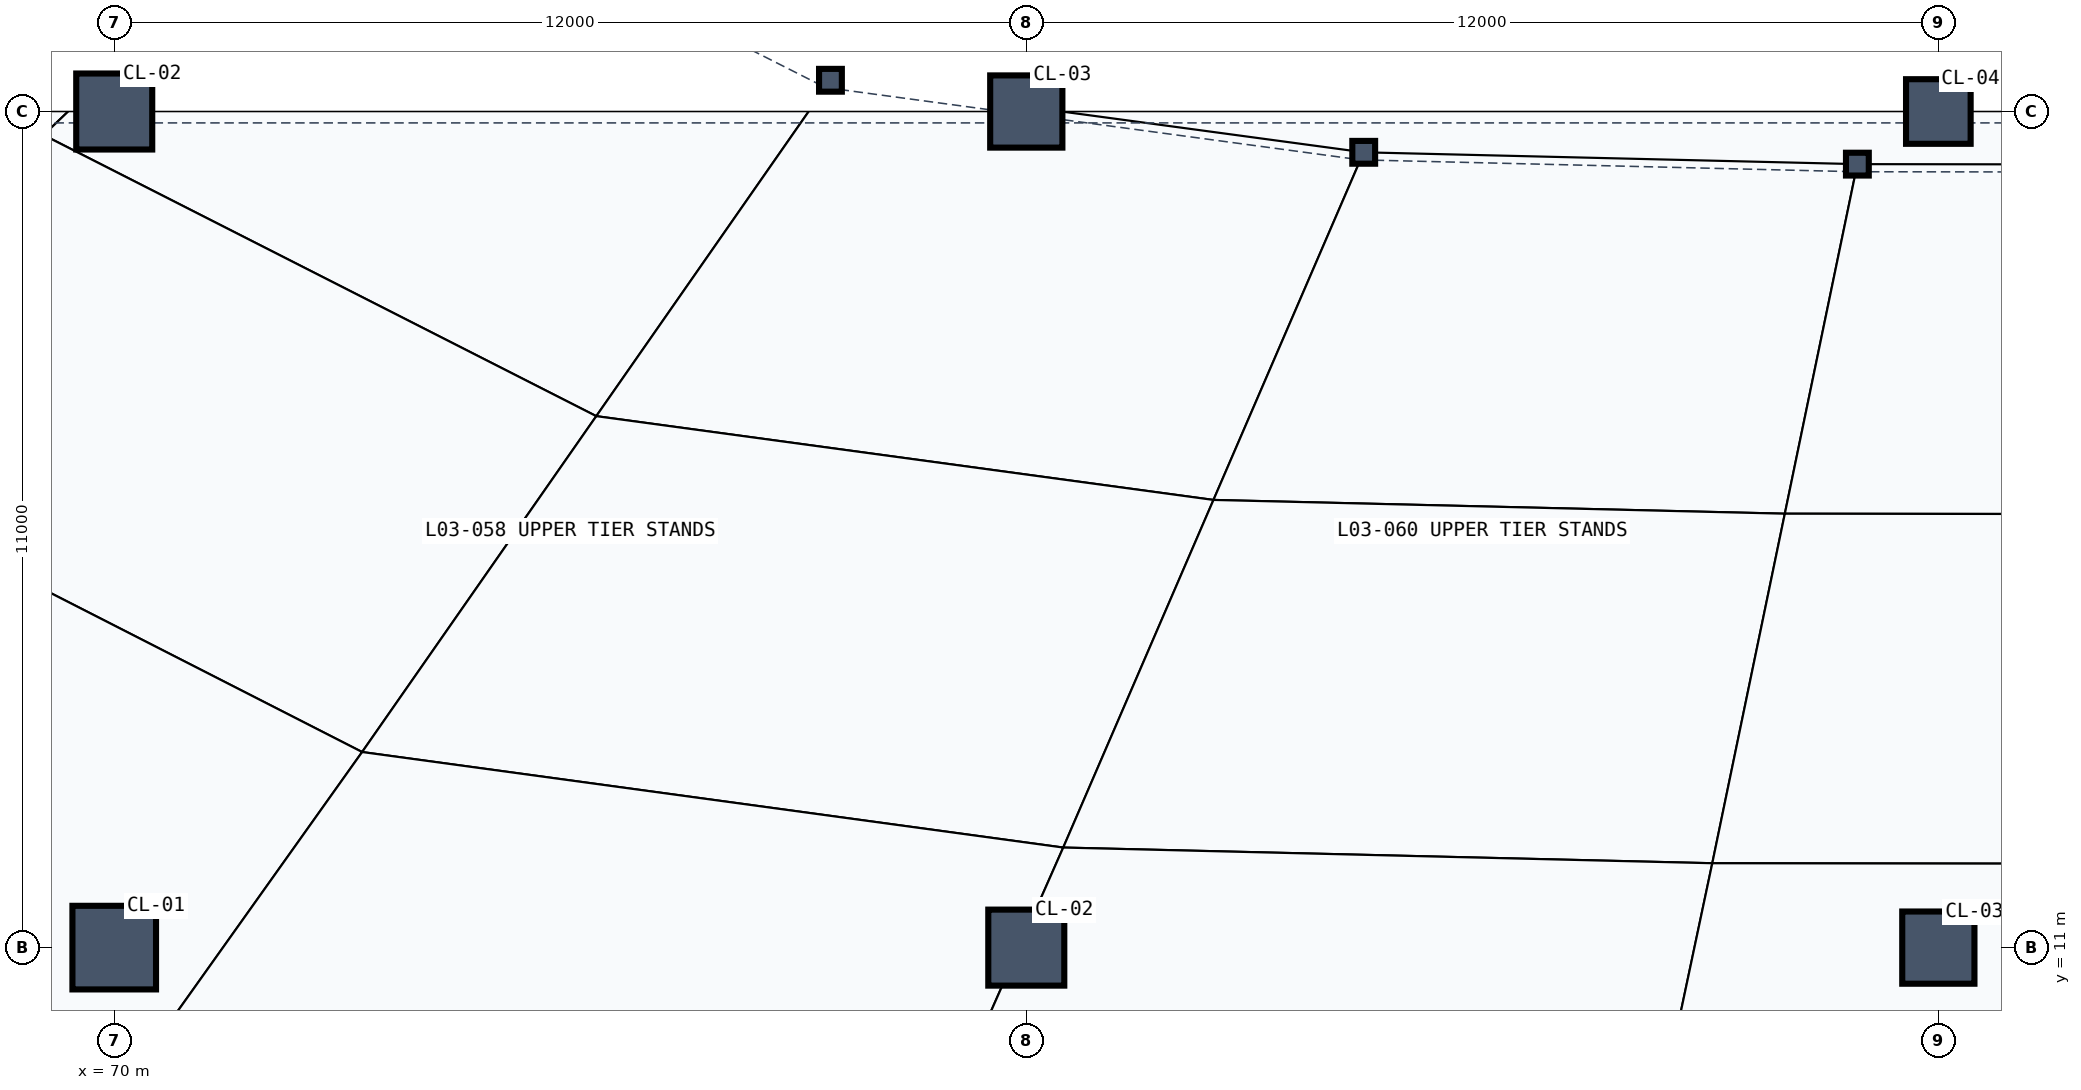
"""IFC4 building model, lengths in metres.
Left out: names, types, materials, properties, quantities, classifications, styles, units other than length and angle.
Written with IfcOpenShell. Run it as: python <this file> out.ifc"""

import sys

from ifc_helpers import new_model, si_unit, direction, frame, origin, origin_2d, place, context, subcontext, project, spatial, rectangle, hollow_rectangle, extrude, element, save


model = new_model("IFC4")
c1 = context("Model", 3, precision=1e-05, world=origin(), true_north=direction((0.0, 1.0)))
c2 = subcontext(c1, "Body", "Model", "MODEL_VIEW")
j1 = project(units=[si_unit("LENGTHUNIT", "METRE"), si_unit("PLANEANGLEUNIT", "RADIAN")], contexts=[c1])
p1 = place(None, origin())
s1 = spatial("IfcSite", under=j1, at=p1, CompositionType="ELEMENT")
p2 = place(p1, origin())
s2 = spatial("IfcBuilding", under=s1, at=p2, CompositionType="ELEMENT")
p3 = place(p2, frame((0.0, 0.0, 14.7)))
s3 = spatial("IfcBuildingStorey", under=s2, at=p3, CompositionType="ELEMENT", Elevation=14.7)
p4 = place(p3, frame((70.0, 11.0, 0.0), z_axis=(0.0, 0.0, 1.0), x_axis=(1.0, 0.0, 0.0)))
e1 = element("IfcColumn", 1, at=p4, inside=s3, PredefinedType="COLUMN", context=c2, shape_type="SweptSolid", body=[
    extrude(rectangle(XDim=1.1, YDim=1.1, at=origin_2d()), origin(), (0.0, 0.0, 1.0), 4.8),
])
for number, where, z_axis, x_axis in (
    (2, (70.0, 22.0, 0.0), (0.0, 0.0, 1.0), (1.0, 0.0, 0.0)),
    (3, (82.0, 11.0, 0.0), (0.0, 0.0, 1.0), (1.0, 0.0, 0.0)),
):
    element("IfcColumn", number, at=place(p3, frame(where, z_axis=z_axis, x_axis=x_axis)), inside=s3, PredefinedType="COLUMN", context=c2, shape_type="SweptSolid", body=[
        extrude(rectangle(XDim=1.0, YDim=1.0, at=origin_2d()), origin(), (0.0, 0.0, 1.0), 4.8),
    ])
for number, where, z_axis, x_axis in (
    (4, (82.0, 22.0, 0.0), (0.0, 0.0, 1.0), (1.0, 0.0, 0.0)),
    (5, (94.0, 11.0, 0.0), (0.0, 0.0, 1.0), (1.0, 0.0, 0.0)),
):
    element("IfcColumn", number, at=place(p3, frame(where, z_axis=z_axis, x_axis=x_axis)), inside=s3, PredefinedType="COLUMN", context=c2, shape_type="SweptSolid", body=[
        extrude(rectangle(XDim=0.95, YDim=0.95, at=origin_2d()), origin(), (0.0, 0.0, 1.0), 4.8),
    ])
p5 = place(p3, frame((94.0, 22.0, 0.0), z_axis=(0.0, 0.0, 1.0), x_axis=(1.0, 0.0, 0.0)))
e6 = element("IfcColumn", 6, at=p5, inside=s3, PredefinedType="COLUMN", context=c2, shape_type="SweptSolid", body=[
    extrude(rectangle(XDim=0.85, YDim=0.85, at=origin_2d()), origin(), (0.0, 0.0, 1.0), 4.8),
])
for number, where, z_axis, x_axis in (
    (7, (79.423, 22.411, 0.0), (0.0, 0.0, 1.0), (1.0, 0.0, 0.0)),
    (8, (86.44, 21.463, 0.0), (0.0, 0.0, 1.0), (1.0, 0.0, 0.0)),
    (9, (92.935, 21.308, 0.0), (0.0, 0.0, 1.0), (1.0, 0.0, 0.0)),
):
    element("IfcColumn", number, at=place(p3, frame(where, z_axis=z_axis, x_axis=x_axis)), inside=s3, PredefinedType="COLUMN", context=c2, shape_type="SweptSolid", body=[
        extrude(hollow_rectangle(XDim=0.3, YDim=0.3, WallThickness=0.016, at=origin_2d()), origin(), (0.0, 0.0, 1.0), 0.32),
    ])
save(model, sys.argv[1])
